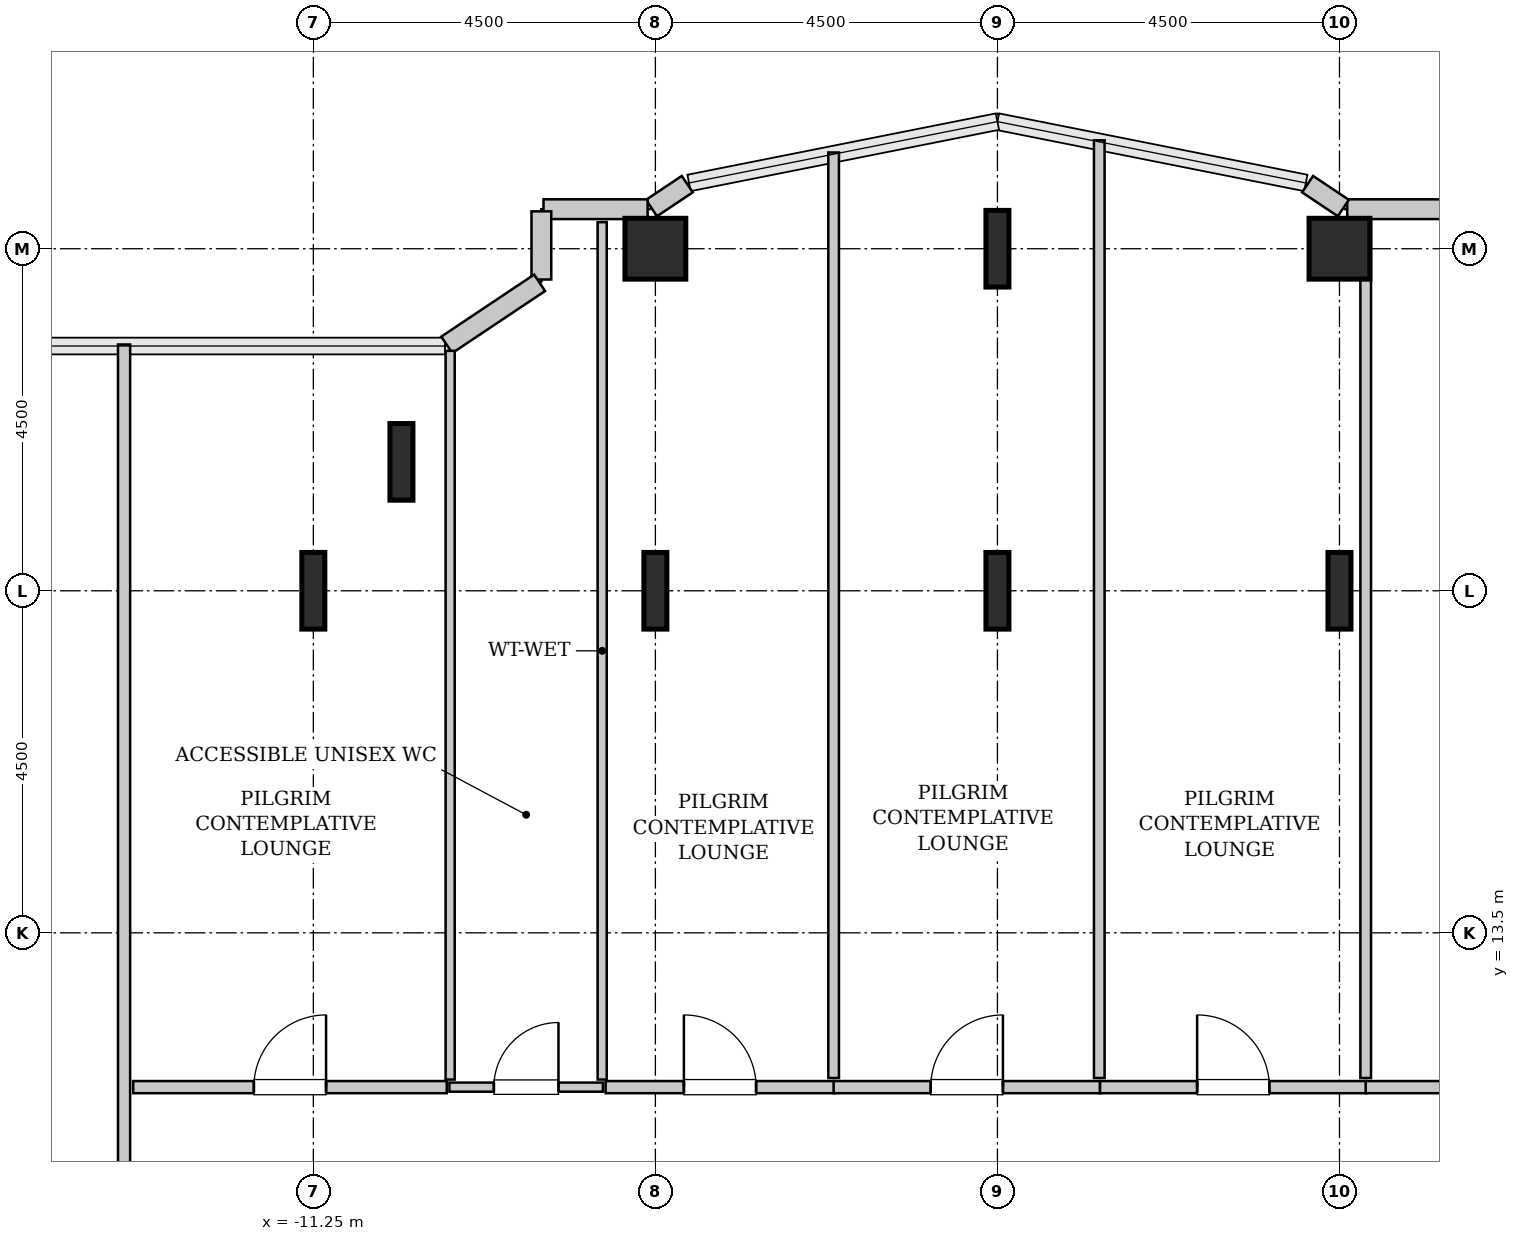
"""IFC4 building model, lengths in metres.
Left out: names, types, materials, properties, quantities, classifications, styles, units other than length and angle.
Written with IfcOpenShell. Run it as: python <this file> out.ifc"""

import sys

from ifc_helpers import new_model, si_unit, direction, frame, frame_2d, origin, origin_2d, place, context, subcontext, project, spatial, rectangle, hollow_rectangle, i_section, extrude, source, transform, mapped, element, fill, save


model = new_model("IFC4")
c1 = context("Model", 3, precision=1e-05, world=origin(), true_north=direction((0.0, 1.0)))
c2 = subcontext(c1, "Body", "Model", "MODEL_VIEW")
j1 = project(units=[si_unit("LENGTHUNIT", "METRE"), si_unit("PLANEANGLEUNIT", "RADIAN")], contexts=[c1])
p1 = place(None, origin())
s1 = spatial("IfcSite", under=j1, at=p1, CompositionType="ELEMENT")
p2 = place(p1, origin())
s2 = spatial("IfcBuilding", under=s1, at=p2, CompositionType="ELEMENT")
p3 = place(p2, frame((0.0, 0.0, 140.2)))
s3 = spatial("IfcBuildingStorey", under=s2, at=p3, CompositionType="ELEMENT", Elevation=140.2)
m1 = source(origin(), c2, "Body", "SweptSolid", [
    extrude(i_section(OverallWidth=0.302, OverallDepth=1.008, WebThickness=0.021, FlangeThickness=0.04, FilletRadius=0.03, at=origin_2d()), origin(), (0.0, 0.0, 1.0), 3.8),
])
for number, where, z_axis, x_axis in (
    (1, (-11.25, 18.0, 0.0), (0.0, 0.0, 1.0), (1.0, 0.0, 0.0)),
    (2, (-10.091, 19.696, 0.0), (0.0, 0.0, 1.0), (1.0, 0.0, 0.0)),
    (3, (-6.75, 18.0, 0.0), (0.0, 0.0, 1.0), (1.0, 0.0, 0.0)),
):
    element("IfcColumn", number, at=place(p3, frame(where, z_axis=z_axis, x_axis=x_axis)), inside=s3, PredefinedType="COLUMN", context=c2, shape_type="MappedRepresentation", body=[
        mapped(m1, transform((0.0, 0.0, 0.0), x_axis=(1.0, 0.0, 0.0), y_axis=(0.0, 1.0, 0.0), z_axis=(0.0, 0.0, 1.0), scale=1.0)),
    ])
m2 = source(origin(), c2, "Body", "SweptSolid", [
    extrude(hollow_rectangle(XDim=0.8, YDim=0.8, WallThickness=0.04, InnerFilletRadius=0.04, OuterFilletRadius=0.08, at=origin_2d()), origin(), (0.0, 0.0, 1.0), 3.8),
])
p4 = place(p3, frame((-6.75, 22.5, 0.0), z_axis=(0.0, 0.0, 1.0), x_axis=(1.0, 0.0, 0.0)))
e4 = element("IfcColumn", 4, at=p4, inside=s3, PredefinedType="COLUMN", context=c2, shape_type="MappedRepresentation", body=[
    mapped(m2, transform((0.0, 0.0, 0.0), x_axis=(1.0, 0.0, 0.0), y_axis=(0.0, 1.0, 0.0), z_axis=(0.0, 0.0, 1.0), scale=1.0)),
])
for number, where, z_axis, x_axis in (
    (5, (-2.25, 18.0, 0.0), (0.0, 0.0, 1.0), (1.0, 0.0, 0.0)),
    (6, (-2.25, 22.5, 0.0), (0.0, 0.0, 1.0), (1.0, 0.0, 0.0)),
    (7, (2.25, 18.0, 0.0), (0.0, 0.0, 1.0), (1.0, 0.0, 0.0)),
):
    element("IfcColumn", number, at=place(p3, frame(where, z_axis=z_axis, x_axis=x_axis)), inside=s3, PredefinedType="COLUMN", context=c2, shape_type="MappedRepresentation", body=[
        mapped(m1, transform((0.0, 0.0, 0.0), x_axis=(1.0, 0.0, 0.0), y_axis=(0.0, 1.0, 0.0), z_axis=(0.0, 0.0, 1.0), scale=1.0)),
    ])
p5 = place(p3, frame((2.25, 22.5, 0.0), z_axis=(0.0, 0.0, 1.0), x_axis=(1.0, 0.0, 0.0)))
e8 = element("IfcColumn", 8, at=p5, inside=s3, PredefinedType="COLUMN", context=c2, shape_type="MappedRepresentation", body=[
    mapped(m2, transform((0.0, 0.0, 0.0), x_axis=(1.0, 0.0, 0.0), y_axis=(0.0, 1.0, 0.0), z_axis=(0.0, 0.0, 1.0), scale=1.0)),
])
m3 = source(origin(), c2, "Body", "SweptSolid", [
    extrude(rectangle(XDim=1.37, YDim=0.26, at=frame_2d((0.685, 0.0))), origin(), (0.0, 0.0, 1.0), 3.5),
])
p6 = place(p3, frame((3.722, 23.02, 0.0), z_axis=(0.0, 0.0, 1.0), x_axis=(-1.0, 0.0, 0.0)))
e9 = element("IfcWall", 9, at=p6, inside=s3, PredefinedType="SOLIDWALL", context=c2, shape_type="MappedRepresentation", body=[
    mapped(m3, transform((0.0, 0.0, 0.0), x_axis=(1.0, 0.0, 0.0), y_axis=(0.0, 1.0, 0.0), z_axis=(0.0, 0.0, 1.0), scale=1.0)),
])
m4 = source(origin(), c2, "Body", "SweptSolid", [
    extrude(rectangle(XDim=0.565, YDim=0.26, at=frame_2d((0.283, 0.0))), origin(), (0.0, 0.0, 1.0), 3.5),
])
for number, where, z_axis, x_axis in (
    (10, (2.301, 23.036, 0.0), (0.0, 0.0, 1.0), (-0.832, 0.555, 0.0)),
    (11, (-6.331, 23.35, 0.0), (0.0, 0.0, 1.0), (-0.832, -0.555, 0.0)),
):
    element("IfcWall", number, at=place(p3, frame(where, z_axis=z_axis, x_axis=x_axis)), inside=s3, PredefinedType="SOLIDWALL", context=c2, shape_type="MappedRepresentation", body=[
        mapped(m4, transform((0.0, 0.0, 0.0), x_axis=(1.0, 0.0, 0.0), y_axis=(0.0, 1.0, 0.0), z_axis=(0.0, 0.0, 1.0), scale=1.0)),
    ])
p7 = place(p3, frame((-6.852, 23.02, 0.0), z_axis=(0.0, 0.0, 1.0), x_axis=(-1.0, 0.0, 0.0)))
e12 = element("IfcWall", 12, at=p7, inside=s3, PredefinedType="SOLIDWALL", context=c2, shape_type="MappedRepresentation", body=[
    mapped(m3, transform((0.0, 0.0, 0.0), x_axis=(1.0, 0.0, 0.0), y_axis=(0.0, 1.0, 0.0), z_axis=(0.0, 0.0, 1.0), scale=1.0)),
])
m5 = source(origin(), c2, "Body", "SweptSolid", [
    extrude(rectangle(XDim=0.897, YDim=0.26, at=frame_2d((0.448, 0.0))), origin(), (0.0, 0.0, 1.0), 3.5),
])
p8 = place(p3, frame((-8.25, 22.992, 0.0), z_axis=(0.0, 0.0, 1.0), x_axis=(0.0, -1.0, 0.0)))
e13 = element("IfcWall", 13, at=p8, inside=s3, PredefinedType="SOLIDWALL", context=c2, shape_type="MappedRepresentation", body=[
    mapped(m5, transform((0.0, 0.0, 0.0), x_axis=(1.0, 0.0, 0.0), y_axis=(0.0, 1.0, 0.0), z_axis=(0.0, 0.0, 1.0), scale=1.0)),
])
m6 = source(origin(), c2, "Body", "SweptSolid", [
    extrude(rectangle(XDim=1.469, YDim=0.26, at=frame_2d((0.734, 0.0))), origin(), (0.0, 0.0, 1.0), 3.5),
])
p9 = place(p3, frame((-8.273, 22.052, 0.0), z_axis=(0.0, 0.0, 1.0), x_axis=(-0.831461760506, -0.555581983884, 0.0)))
e14 = element("IfcWall", 14, at=p9, inside=s3, PredefinedType="SOLIDWALL", context=c2, shape_type="MappedRepresentation", body=[
    mapped(m6, transform((0.0, 0.0, 0.0), x_axis=(1.0, 0.0, 0.0), y_axis=(0.0, 1.0, 0.0), z_axis=(0.0, 0.0, 1.0), scale=1.0)),
])
m7 = source(origin(), c2, "Body", "SweptSolid", [
    extrude(rectangle(XDim=2.02, YDim=0.12, at=frame_2d((1.01, 0.0))), origin(), (0.0, 0.0, 1.0), 3.485),
])
p10 = place(p3, frame((-9.46, 11.47, 0.0), z_axis=(0.0, 0.0, 1.0), x_axis=(1.0, 0.0, 0.0)))
e15 = element("IfcWall", 15, at=p10, inside=s3, PredefinedType="PLUMBINGWALL", context=c2, shape_type="MappedRepresentation", body=[
    mapped(m7, transform((0.0, 0.0, 0.0), x_axis=(1.0, 0.0, 0.0), y_axis=(0.0, 1.0, 0.0), z_axis=(0.0, 0.0, 1.0), scale=1.0)),
])
p11 = place(p10, frame((0.585, 0.0, 0.0)))
e16 = element("IfcOpeningElement", 16, at=p11, cuts=e15, PredefinedType="OPENING", context=c2, shape_type="SweptSolid", body=[
    extrude(rectangle(XDim=0.85, YDim=2.1, at=frame_2d((0.425, 1.05))), frame((0.0, 0.07, 0.0), z_axis=(0.0, -1.0, 0.0), x_axis=(1.0, 0.0, 0.0)), (0.0, 0.0, 1.0), 0.14),
])
m8 = source(origin(), c2, "Body", "SweptSolid", [
    extrude(rectangle(XDim=11.28, YDim=0.12, at=frame_2d((5.64, 0.0))), origin(), (0.0, 0.0, 1.0), 3.485),
])
p12 = place(p3, frame((-7.45, 11.57, 0.0), z_axis=(0.0, 0.0, 1.0), x_axis=(0.0, 1.0, 0.0)))
e17 = element("IfcWall", 17, at=p12, inside=s3, PredefinedType="PLUMBINGWALL", context=c2, shape_type="MappedRepresentation", body=[
    mapped(m8, transform((0.0, 0.0, 0.0), x_axis=(1.0, 0.0, 0.0), y_axis=(0.0, 1.0, 0.0), z_axis=(0.0, 0.0, 1.0), scale=1.0)),
])
m9 = source(origin(), c2, "Body", "SweptSolid", [
    extrude(rectangle(XDim=9.587, YDim=0.12, at=frame_2d((4.793, 0.0))), origin(), (0.0, 0.0, 1.0), 3.485),
])
p13 = place(p3, frame((-9.45, 11.57, 0.0), z_axis=(0.0, 0.0, 1.0), x_axis=(0.0, 1.0, 0.0)))
e18 = element("IfcWall", 18, at=p13, inside=s3, PredefinedType="PLUMBINGWALL", context=c2, shape_type="MappedRepresentation", body=[
    mapped(m9, transform((0.0, 0.0, 0.0), x_axis=(1.0, 0.0, 0.0), y_axis=(0.0, 1.0, 0.0), z_axis=(0.0, 0.0, 1.0), scale=1.0)),
])
m10 = source(origin(), c2, "Body", "SweptSolid", [
    extrude(rectangle(XDim=13.353, YDim=0.16, at=frame_2d((6.676, 0.0))), origin(), (0.0, 0.0, 1.0), 3.485),
])
p14 = place(p3, frame((-13.74, 7.887, 0.0), z_axis=(0.0, 0.0, 1.0), x_axis=(0.0, 1.0, 0.0)))
e19 = element("IfcWall", 19, at=p14, inside=s3, PredefinedType="PARTITIONING", context=c2, shape_type="MappedRepresentation", body=[
    mapped(m10, transform((0.0, 0.0, 0.0), x_axis=(1.0, 0.0, 0.0), y_axis=(0.0, 1.0, 0.0), z_axis=(0.0, 0.0, 1.0), scale=1.0)),
])
p15 = place(p14, frame((1.336, 0.0, 0.0)))
e20 = element("IfcOpeningElement", 20, at=p15, cuts=e19, PredefinedType="OPENING", context=c2, shape_type="SweptSolid", body=[
    extrude(rectangle(XDim=0.95, YDim=2.1, at=frame_2d((0.475, 1.05))), frame((0.0, 0.09, 0.0), z_axis=(0.0, -1.0, 0.0), x_axis=(1.0, 0.0, 0.0)), (0.0, 0.0, 1.0), 0.18),
])
m11 = source(origin(), c2, "Body", "SweptSolid", [
    extrude(rectangle(XDim=4.125, YDim=0.16, at=frame_2d((2.062, 0.0))), origin(), (0.0, 0.0, 1.0), 3.485),
])
p16 = place(p3, frame((-13.62, 11.47, 0.0), z_axis=(0.0, 0.0, 1.0), x_axis=(1.0, 0.0, 0.0)))
e21 = element("IfcWall", 21, at=p16, inside=s3, PredefinedType="PARTITIONING", context=c2, shape_type="MappedRepresentation", body=[
    mapped(m11, transform((0.0, 0.0, 0.0), x_axis=(1.0, 0.0, 0.0), y_axis=(0.0, 1.0, 0.0), z_axis=(0.0, 0.0, 1.0), scale=1.0)),
])
p17 = place(p16, frame((1.587, 0.0, 0.0)))
e22 = element("IfcOpeningElement", 22, at=p17, cuts=e21, PredefinedType="OPENING", context=c2, shape_type="SweptSolid", body=[
    extrude(rectangle(XDim=0.95, YDim=2.1, at=frame_2d((0.475, 1.05))), frame((0.0, 0.09, 0.0), z_axis=(0.0, -1.0, 0.0), x_axis=(1.0, 0.0, 0.0)), (0.0, 0.0, 1.0), 0.18),
])
m12 = source(origin(), c2, "Body", "SweptSolid", [
    extrude(rectangle(XDim=3.01, YDim=0.16, at=frame_2d((1.505, 0.0))), origin(), (0.0, 0.0, 1.0), 3.485),
])
p18 = place(p3, frame((-7.405, 11.47, 0.0), z_axis=(0.0, 0.0, 1.0), x_axis=(1.0, 0.0, 0.0)))
e23 = element("IfcWall", 23, at=p18, inside=s3, PredefinedType="PARTITIONING", context=c2, shape_type="MappedRepresentation", body=[
    mapped(m12, transform((0.0, 0.0, 0.0), x_axis=(1.0, 0.0, 0.0), y_axis=(0.0, 1.0, 0.0), z_axis=(0.0, 0.0, 1.0), scale=1.0)),
])
p19 = place(p18, frame((1.03, 0.0, 0.0)))
e24 = element("IfcOpeningElement", 24, at=p19, cuts=e23, PredefinedType="OPENING", context=c2, shape_type="SweptSolid", body=[
    extrude(rectangle(XDim=0.95, YDim=2.1, at=frame_2d((0.475, 1.05))), frame((0.0, 0.09, 0.0), z_axis=(0.0, -1.0, 0.0), x_axis=(1.0, 0.0, 0.0)), (0.0, 0.0, 1.0), 0.18),
])
m13 = source(origin(), c2, "Body", "SweptSolid", [
    extrude(rectangle(XDim=12.176, YDim=0.14, at=frame_2d((6.088, 0.0))), origin(), (0.0, 0.0, 1.0), 3.485),
])
p20 = place(p3, frame((-4.405, 11.59, 0.0), z_axis=(0.0, 0.0, 1.0), x_axis=(0.0, 1.0, 0.0)))
e25 = element("IfcWall", 25, at=p20, inside=s3, PredefinedType="PARTITIONING", context=c2, shape_type="MappedRepresentation", body=[
    mapped(m13, transform((0.0, 0.0, 0.0), x_axis=(1.0, 0.0, 0.0), y_axis=(0.0, 1.0, 0.0), z_axis=(0.0, 0.0, 1.0), scale=1.0)),
])
m14 = source(origin(), c2, "Body", "SweptSolid", [
    extrude(rectangle(XDim=3.505, YDim=0.16, at=frame_2d((1.752, 0.0))), origin(), (0.0, 0.0, 1.0), 3.485),
])
p21 = place(p3, frame((-4.405, 11.47, 0.0), z_axis=(0.0, 0.0, 1.0), x_axis=(1.0, 0.0, 0.0)))
e26 = element("IfcWall", 26, at=p21, inside=s3, PredefinedType="PARTITIONING", context=c2, shape_type="MappedRepresentation", body=[
    mapped(m14, transform((0.0, 0.0, 0.0), x_axis=(1.0, 0.0, 0.0), y_axis=(0.0, 1.0, 0.0), z_axis=(0.0, 0.0, 1.0), scale=1.0)),
])
p22 = place(p21, frame((1.278, 0.0, 0.0)))
e27 = element("IfcOpeningElement", 27, at=p22, cuts=e26, PredefinedType="OPENING", context=c2, shape_type="SweptSolid", body=[
    extrude(rectangle(XDim=0.95, YDim=2.1, at=frame_2d((0.475, 1.05))), frame((0.0, 0.09, 0.0), z_axis=(0.0, -1.0, 0.0), x_axis=(1.0, 0.0, 0.0)), (0.0, 0.0, 1.0), 0.18),
])
m15 = source(origin(), c2, "Body", "SweptSolid", [
    extrude(rectangle(XDim=12.336, YDim=0.14, at=frame_2d((6.168, 0.0))), origin(), (0.0, 0.0, 1.0), 3.485),
])
p23 = place(p3, frame((-0.91, 11.59, 0.0), z_axis=(0.0, 0.0, 1.0), x_axis=(0.0, 1.0, 0.0)))
e28 = element("IfcWall", 28, at=p23, inside=s3, PredefinedType="PARTITIONING", context=c2, shape_type="MappedRepresentation", body=[
    mapped(m15, transform((0.0, 0.0, 0.0), x_axis=(1.0, 0.0, 0.0), y_axis=(0.0, 1.0, 0.0), z_axis=(0.0, 0.0, 1.0), scale=1.0)),
])
m16 = source(origin(), c2, "Body", "SweptSolid", [
    extrude(rectangle(XDim=3.505, YDim=0.16, at=frame_2d((1.752, 0.0))), origin(), (0.0, 0.0, 1.0), 3.485),
])
p24 = place(p3, frame((-0.9, 11.47, 0.0), z_axis=(0.0, 0.0, 1.0), x_axis=(1.0, 0.0, 0.0)))
e29 = element("IfcWall", 29, at=p24, inside=s3, PredefinedType="PARTITIONING", context=c2, shape_type="MappedRepresentation", body=[
    mapped(m16, transform((0.0, 0.0, 0.0), x_axis=(1.0, 0.0, 0.0), y_axis=(0.0, 1.0, 0.0), z_axis=(0.0, 0.0, 1.0), scale=1.0)),
])
p25 = place(p24, frame((1.278, 0.0, 0.0)))
e30 = element("IfcOpeningElement", 30, at=p25, cuts=e29, PredefinedType="OPENING", context=c2, shape_type="SweptSolid", body=[
    extrude(rectangle(XDim=0.95, YDim=2.1, at=frame_2d((0.475, 1.05))), frame((0.0, 0.09, 0.0), z_axis=(0.0, -1.0, 0.0), x_axis=(1.0, 0.0, 0.0)), (0.0, 0.0, 1.0), 0.18),
])
m17 = source(origin(), c2, "Body", "SweptSolid", [
    extrude(rectangle(XDim=11.26, YDim=0.14, at=frame_2d((5.63, 0.0))), origin(), (0.0, 0.0, 1.0), 2.825),
])
p26 = place(p3, frame((2.595, 11.59, 0.0), z_axis=(0.0, 0.0, 1.0), x_axis=(0.0, 1.0, 0.0)))
e31 = element("IfcWall", 31, at=p26, inside=s3, PredefinedType="PARTITIONING", context=c2, shape_type="MappedRepresentation", body=[
    mapped(m17, transform((0.0, 0.0, 0.0), x_axis=(1.0, 0.0, 0.0), y_axis=(0.0, 1.0, 0.0), z_axis=(0.0, 0.0, 1.0), scale=1.0)),
])
m18 = source(origin(), c2, "Body", "SweptSolid", [
    extrude(rectangle(XDim=5.61, YDim=0.16, at=frame_2d((2.805, 0.0))), origin(), (0.0, 0.0, 1.0), 3.485),
])
p27 = place(p3, frame((2.595, 11.47, 0.0), z_axis=(0.0, 0.0, 1.0), x_axis=(1.0, 0.0, 0.0)))
e32 = element("IfcWall", 32, at=p27, inside=s3, PredefinedType="PARTITIONING", context=c2, shape_type="MappedRepresentation", body=[
    mapped(m18, transform((0.0, 0.0, 0.0), x_axis=(1.0, 0.0, 0.0), y_axis=(0.0, 1.0, 0.0), z_axis=(0.0, 0.0, 1.0), scale=1.0)),
])
p28 = place(p27, frame((2.33, 0.0, 0.0)))
e33 = element("IfcOpeningElement", 33, at=p28, cuts=e32, PredefinedType="OPENING", context=c2, shape_type="SweptSolid", body=[
    extrude(rectangle(XDim=0.95, YDim=2.1, at=frame_2d((0.475, 1.05))), frame((0.0, 0.09, 0.0), z_axis=(0.0, -1.0, 0.0), x_axis=(1.0, 0.0, 0.0)), (0.0, 0.0, 1.0), 0.18),
])
m19 = source(origin(), c2, "Body", "SweptSolid", [
    extrude(rectangle(XDim=0.85, YDim=2.1, at=frame_2d((0.425, 1.05))), frame((0.0, 0.025, 0.0), z_axis=(0.0, -1.0, 0.0), x_axis=(1.0, 0.0, 0.0)), (0.0, 0.0, 1.0), 0.05),
])
p29 = place(p11, origin())
e34 = element("IfcDoor", 34, at=p29, inside=s3, OperationType="SINGLE_SWING_RIGHT", PredefinedType="DOOR", context=c2, shape_type="MappedRepresentation", body=[
    mapped(m19, transform((0.0, 0.0, 0.0), x_axis=(1.0, 0.0, 0.0), y_axis=(0.0, 1.0, 0.0), z_axis=(0.0, 0.0, 1.0), scale=1.0)),
])
fill(e16, e34)
m20 = source(origin(), c2, "Body", "SweptSolid", [
    extrude(rectangle(XDim=0.95, YDim=2.1, at=frame_2d((0.475, 1.05))), frame((0.0, 0.025, 0.0), z_axis=(0.0, -1.0, 0.0), x_axis=(1.0, 0.0, 0.0)), (0.0, 0.0, 1.0), 0.05),
])
p30 = place(p17, origin())
e35 = element("IfcDoor", 35, at=p30, inside=s3, OperationType="SINGLE_SWING_RIGHT", PredefinedType="DOOR", context=c2, shape_type="MappedRepresentation", body=[
    mapped(m20, transform((0.0, 0.0, 0.0), x_axis=(1.0, 0.0, 0.0), y_axis=(0.0, 1.0, 0.0), z_axis=(0.0, 0.0, 1.0), scale=1.0)),
])
fill(e22, e35)
p31 = place(p19, origin())
e36 = element("IfcDoor", 36, at=p31, inside=s3, OperationType="SINGLE_SWING_LEFT", PredefinedType="DOOR", context=c2, shape_type="MappedRepresentation", body=[
    mapped(m20, transform((0.0, 0.0, 0.0), x_axis=(1.0, 0.0, 0.0), y_axis=(0.0, 1.0, 0.0), z_axis=(0.0, 0.0, 1.0), scale=1.0)),
])
fill(e24, e36)
p32 = place(p22, origin())
e37 = element("IfcDoor", 37, at=p32, inside=s3, OperationType="SINGLE_SWING_RIGHT", PredefinedType="DOOR", context=c2, shape_type="MappedRepresentation", body=[
    mapped(m20, transform((0.0, 0.0, 0.0), x_axis=(1.0, 0.0, 0.0), y_axis=(0.0, 1.0, 0.0), z_axis=(0.0, 0.0, 1.0), scale=1.0)),
])
fill(e27, e37)
p33 = place(p25, origin())
e38 = element("IfcDoor", 38, at=p33, inside=s3, OperationType="SINGLE_SWING_LEFT", PredefinedType="DOOR", context=c2, shape_type="MappedRepresentation", body=[
    mapped(m20, transform((0.0, 0.0, 0.0), x_axis=(1.0, 0.0, 0.0), y_axis=(0.0, 1.0, 0.0), z_axis=(0.0, 0.0, 1.0), scale=1.0)),
])
fill(e30, e38)
save(model, sys.argv[1])
